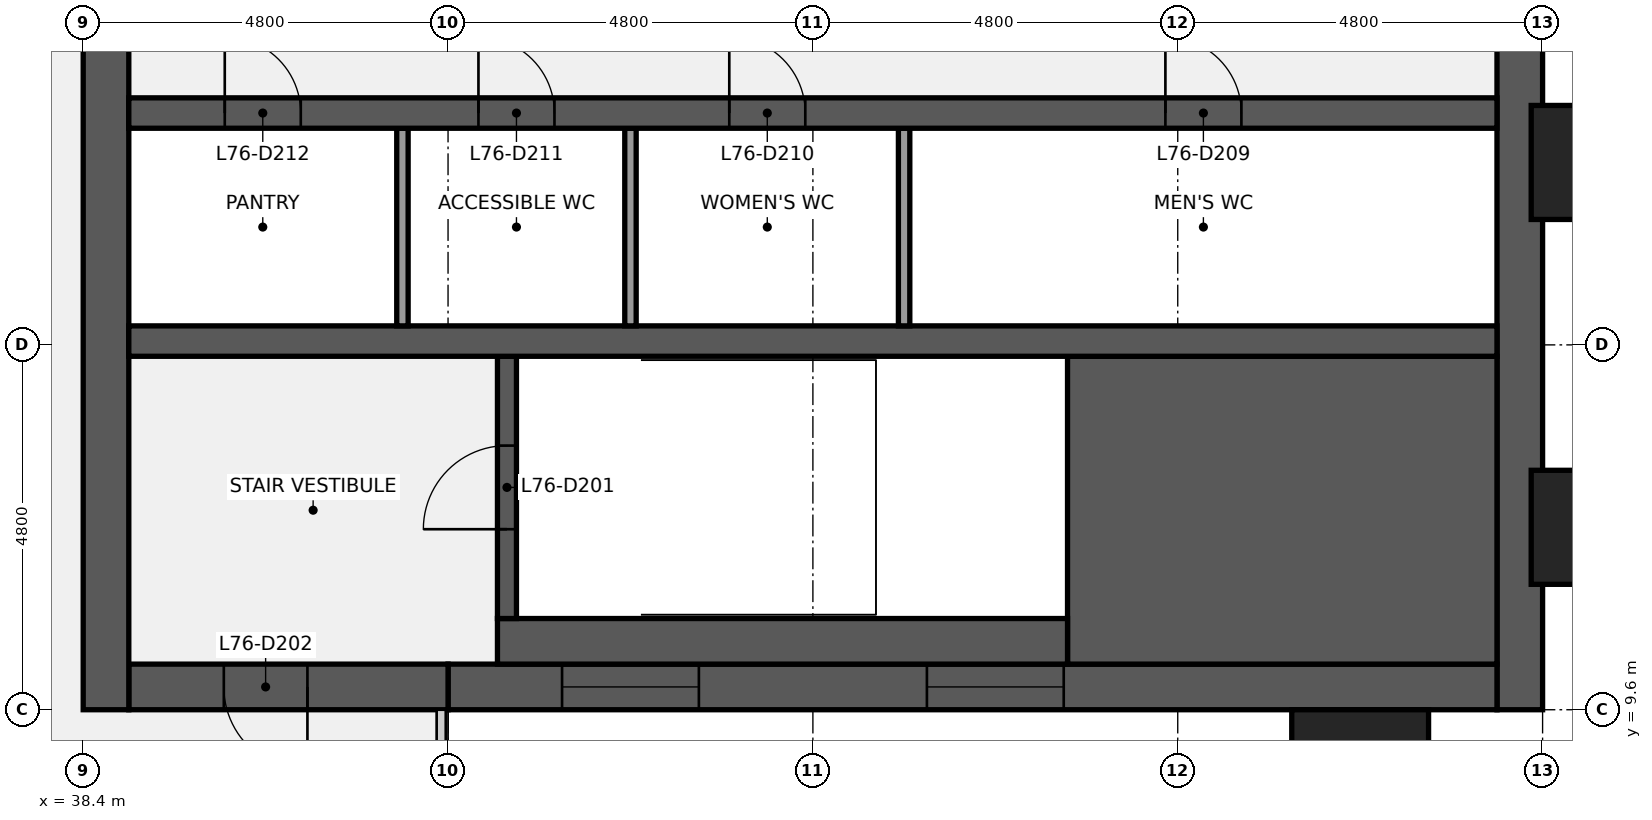
"""IFC4 building model, lengths in metres.
Left out: names, types, materials, properties, quantities, classifications, styles, units other than length and angle.
Written with IfcOpenShell. Run it as: python <this file> out.ifc"""

import sys

from ifc_helpers import new_model, si_unit, direction, frame, frame_2d, origin, origin_2d, place, context, subcontext, project, spatial, rectangle, extrude, element, fill, save


model = new_model("IFC4")
c1 = context("Model", 3, precision=1e-05, world=origin(), true_north=direction((0.0, 1.0)))
c2 = subcontext(c1, "Body", "Model", "MODEL_VIEW")
j1 = project(units=[si_unit("LENGTHUNIT", "METRE"), si_unit("PLANEANGLEUNIT", "RADIAN")], contexts=[c1])
p1 = place(None, origin())
s1 = spatial("IfcSite", under=j1, at=p1, CompositionType="ELEMENT")
p2 = place(p1, origin())
s2 = spatial("IfcBuilding", under=s1, at=p2, CompositionType="ELEMENT")
p3 = place(p2, frame((0.0, 0.0, 342.3)))
s3 = spatial("IfcBuildingStorey", under=s2, at=p3, CompositionType="ELEMENT", Elevation=342.3)
p4 = place(p3, frame((57.3, 38.4, 0.0), z_axis=(0.0, 0.0, 1.0), x_axis=(0.0, -1.0, 0.0)))
e1 = element("IfcWall", 1, at=p4, inside=s3, PredefinedType="SHEAR", context=c2, shape_type="SweptSolid", body=[
    extrude(rectangle(XDim=28.8, YDim=0.6, at=frame_2d((14.4, 0.0))), origin(), (0.0, 0.0, 1.0), 3.84),
])
p5 = place(p4, frame((18.45, 0.0, 0.9)))
e2 = element("IfcOpeningElement", 2, at=p5, cuts=e1, PredefinedType="OPENING", context=c2, shape_type="SweptSolid", body=[
    extrude(rectangle(XDim=1.5, YDim=1.5, at=frame_2d((0.75, 0.75))), frame((0.0, 0.31, 0.0), z_axis=(0.0, -1.0, 0.0), x_axis=(1.0, 0.0, 0.0)), (0.0, 0.0, 1.0), 0.62),
])
p6 = place(p4, frame((8.85, 0.0, 0.9)))
e3 = element("IfcOpeningElement", 3, at=p6, cuts=e1, PredefinedType="OPENING", context=c2, shape_type="SweptSolid", body=[
    extrude(rectangle(XDim=1.5, YDim=1.5, at=frame_2d((0.75, 0.75))), frame((0.0, 0.31, 0.0), z_axis=(0.0, -1.0, 0.0), x_axis=(1.0, 0.0, 0.0)), (0.0, 0.0, 1.0), 0.62),
])
p7 = place(p3, frame((57.0, 9.9, 0.0), z_axis=(0.0, 0.0, 1.0), x_axis=(-1.0, 0.0, 0.0)))
e4 = element("IfcWall", 4, at=p7, inside=s3, PredefinedType="SHEAR", context=c2, shape_type="SweptSolid", body=[
    extrude(rectangle(XDim=13.8, YDim=0.6, at=frame_2d((6.9, 0.0))), origin(), (0.0, 0.0, 1.0), 3.84),
])
p8 = place(p7, frame((5.7, 0.0, 0.9)))
e5 = element("IfcOpeningElement", 5, at=p8, cuts=e4, PredefinedType="OPENING", context=c2, shape_type="SweptSolid", body=[
    extrude(rectangle(XDim=1.8, YDim=1.5, at=frame_2d((0.9, 0.75))), frame((0.0, 0.31, 0.0), z_axis=(0.0, -1.0, 0.0), x_axis=(1.0, 0.0, 0.0)), (0.0, 0.0, 1.0), 0.62),
])
p9 = place(p7, frame((10.5, 0.0, 0.9)))
e6 = element("IfcOpeningElement", 6, at=p9, cuts=e4, PredefinedType="OPENING", context=c2, shape_type="SweptSolid", body=[
    extrude(rectangle(XDim=1.8, YDim=1.5, at=frame_2d((0.9, 0.75))), frame((0.0, 0.31, 0.0), z_axis=(0.0, -1.0, 0.0), x_axis=(1.0, 0.0, 0.0)), (0.0, 0.0, 1.0), 0.62),
])
p10 = place(p3, frame((43.2, 9.9, 0.0), z_axis=(0.0, 0.0, 1.0), x_axis=(-1.0, 0.0, 0.0)))
e7 = element("IfcWall", 7, at=p10, inside=s3, PredefinedType="SHEAR", context=c2, shape_type="SweptSolid", body=[
    extrude(rectangle(XDim=4.2, YDim=0.6, at=frame_2d((2.1, 0.0))), origin(), (0.0, 0.0, 1.0), 3.84),
])
p11 = place(p10, frame((1.85, 0.0, 0.0)))
e8 = element("IfcOpeningElement", 8, at=p11, cuts=e7, PredefinedType="OPENING", context=c2, shape_type="SweptSolid", body=[
    extrude(rectangle(XDim=1.1, YDim=2.1, at=frame_2d((0.55, 1.05))), frame((0.0, 0.31, 0.0), z_axis=(0.0, -1.0, 0.0), x_axis=(1.0, 0.0, 0.0)), (0.0, 0.0, 1.0), 0.62),
])
p12 = place(p3, frame((38.7, 9.6, 0.0), z_axis=(0.0, 0.0, 1.0), x_axis=(0.0, 1.0, 0.0)))
e9 = element("IfcWall", 9, at=p12, inside=s3, PredefinedType="SHEAR", context=c2, shape_type="SweptSolid", body=[
    extrude(rectangle(XDim=28.8, YDim=0.6, at=frame_2d((14.4, 0.0))), origin(), (0.0, 0.0, 1.0), 3.84),
])
p13 = place(p12, frame((8.7, 0.0, 0.0)))
e10 = element("IfcOpeningElement", 10, at=p13, cuts=e9, PredefinedType="OPENING", context=c2, shape_type="SweptSolid", body=[
    extrude(rectangle(XDim=1.8, YDim=2.1, at=frame_2d((0.9, 1.05))), frame((0.0, 0.31, 0.0), z_axis=(0.0, -1.0, 0.0), x_axis=(1.0, 0.0, 0.0)), (0.0, 0.0, 1.0), 0.62),
])
p14 = place(p12, frame((18.3, 0.0, 0.0)))
e11 = element("IfcOpeningElement", 11, at=p14, cuts=e9, PredefinedType="OPENING", context=c2, shape_type="SweptSolid", body=[
    extrude(rectangle(XDim=1.8, YDim=2.1, at=frame_2d((0.9, 1.05))), frame((0.0, 0.31, 0.0), z_axis=(0.0, -1.0, 0.0), x_axis=(1.0, 0.0, 0.0)), (0.0, 0.0, 1.0), 0.62),
])
p15 = place(p3, frame((51.35, 12.225, 0.0), z_axis=(0.0, 0.0, 1.0), x_axis=(1.0, 0.0, 0.0)))
e12 = element("IfcWall", 12, at=p15, inside=s3, PredefinedType="SHEAR", context=c2, shape_type="SweptSolid", body=[
    extrude(rectangle(XDim=5.65, YDim=4.05, at=frame_2d((2.825, 0.0))), origin(), (0.0, 0.0, 1.0), 3.84),
])
p16 = place(p3, frame((43.85, 10.5, 0.0), z_axis=(0.0, 0.0, 1.0), x_axis=(1.0, 0.0, 0.0)))
e13 = element("IfcWall", 13, at=p16, inside=s3, PredefinedType="SHEAR", context=c2, shape_type="SweptSolid", body=[
    extrude(rectangle(XDim=7.5, YDim=0.6, at=frame_2d((3.75, 0.0))), origin(), (0.0, 0.0, 1.0), 3.84),
])
p17 = place(p3, frame((43.975, 10.8, 0.0), z_axis=(0.0, 0.0, 1.0), x_axis=(0.0, 1.0, 0.0)))
e14 = element("IfcWall", 14, at=p17, inside=s3, PredefinedType="SHEAR", context=c2, shape_type="SweptSolid", body=[
    extrude(rectangle(XDim=3.45, YDim=0.25, at=frame_2d((1.725, 0.0))), origin(), (0.0, 0.0, 1.0), 3.84),
])
p18 = place(p17, frame((1.175, 0.0, 0.0)))
e15 = element("IfcOpeningElement", 15, at=p18, cuts=e14, PredefinedType="OPENING", context=c2, shape_type="SweptSolid", body=[
    extrude(rectangle(XDim=1.1, YDim=2.1, at=frame_2d((0.55, 1.05))), frame((0.0, 0.135, 0.0), z_axis=(0.0, -1.0, 0.0), x_axis=(1.0, 0.0, 0.0)), (0.0, 0.0, 1.0), 0.27),
])
p19 = place(p3, frame((39.0, 14.45, 0.0), z_axis=(0.0, 0.0, 1.0), x_axis=(1.0, 0.0, 0.0)))
e16 = element("IfcWall", 16, at=p19, inside=s3, PredefinedType="SHEAR", context=c2, shape_type="SweptSolid", body=[
    extrude(rectangle(XDim=18.0, YDim=0.4, at=frame_2d((9.0, 0.0))), origin(), (0.0, 0.0, 1.0), 3.84),
])
for number, where, z_axis, x_axis in (
    (17, (49.2, 14.65, 0.0), (0.0, 0.0, 1.0), (0.0, 1.0, 0.0)),
    (18, (45.6, 14.65, 0.0), (0.0, 0.0, 1.0), (0.0, 1.0, 0.0)),
    (19, (42.6, 14.65, 0.0), (0.0, 0.0, 1.0), (0.0, 1.0, 0.0)),
):
    element("IfcWall", number, at=place(p3, frame(where, z_axis=z_axis, x_axis=x_axis)), inside=s3, PredefinedType="PARTITIONING", context=c2, shape_type="SweptSolid", body=[
        extrude(rectangle(XDim=2.6, YDim=0.15, at=frame_2d((1.3, 0.0))), origin(), (0.0, 0.0, 1.0), 3.84),
    ])
p20 = place(p3, frame((39.0, 17.45, 0.0), z_axis=(0.0, 0.0, 1.0), x_axis=(1.0, 0.0, 0.0)))
e20 = element("IfcWall", 20, at=p20, inside=s3, PredefinedType="SHEAR", context=c2, shape_type="SweptSolid", body=[
    extrude(rectangle(XDim=18.0, YDim=0.4, at=frame_2d((9.0, 0.0))), origin(), (0.0, 0.0, 1.0), 3.84),
])
p21 = place(p20, frame((13.637, 0.0, 0.0)))
e21 = element("IfcOpeningElement", 21, at=p21, cuts=e20, PredefinedType="OPENING", context=c2, shape_type="SweptSolid", body=[
    extrude(rectangle(XDim=1.0, YDim=2.1, at=frame_2d((0.5, 1.05))), frame((0.0, 0.21, 0.0), z_axis=(0.0, -1.0, 0.0), x_axis=(1.0, 0.0, 0.0)), (0.0, 0.0, 1.0), 0.42),
])
p22 = place(p20, frame((7.9, 0.0, 0.0)))
e22 = element("IfcOpeningElement", 22, at=p22, cuts=e20, PredefinedType="OPENING", context=c2, shape_type="SweptSolid", body=[
    extrude(rectangle(XDim=1.0, YDim=2.1, at=frame_2d((0.5, 1.05))), frame((0.0, 0.21, 0.0), z_axis=(0.0, -1.0, 0.0), x_axis=(1.0, 0.0, 0.0)), (0.0, 0.0, 1.0), 0.42),
])
p23 = place(p20, frame((4.6, 0.0, 0.0)))
e23 = element("IfcOpeningElement", 23, at=p23, cuts=e20, PredefinedType="OPENING", context=c2, shape_type="SweptSolid", body=[
    extrude(rectangle(XDim=1.0, YDim=2.1, at=frame_2d((0.5, 1.05))), frame((0.0, 0.21, 0.0), z_axis=(0.0, -1.0, 0.0), x_axis=(1.0, 0.0, 0.0)), (0.0, 0.0, 1.0), 0.42),
])
p24 = place(p20, frame((1.262, 0.0, 0.0)))
e24 = element("IfcOpeningElement", 24, at=p24, cuts=e20, PredefinedType="OPENING", context=c2, shape_type="SweptSolid", body=[
    extrude(rectangle(XDim=1.0, YDim=2.1, at=frame_2d((0.5, 1.05))), frame((0.0, 0.21, 0.0), z_axis=(0.0, -1.0, 0.0), x_axis=(1.0, 0.0, 0.0)), (0.0, 0.0, 1.0), 0.42),
])
for number, where, z_axis, x_axis in (
    (25, (55.2, 8.85, 0.0), (0.0, 0.0, 1.0), (1.0, 0.0, 0.0)),
    (26, (58.35, 12.0, 0.0), (0.0, 0.0, 1.0), (0.0, 1.0, 0.0)),
    (27, (58.35, 16.8, 0.0), (0.0, 0.0, 1.0), (0.0, 1.0, 0.0)),
):
    element("IfcColumn", number, at=place(p3, frame(where, z_axis=z_axis, x_axis=x_axis)), inside=s3, PredefinedType="PILASTER", context=c2, shape_type="SweptSolid", body=[
        extrude(rectangle(XDim=1.8, YDim=1.5, at=origin_2d()), origin(), (0.0, 0.0, 1.0), 4.0),
    ])
p25 = place(p18, origin())
e28 = element("IfcDoor", 28, at=p25, inside=s3, OperationType="SINGLE_SWING_LEFT", PredefinedType="DOOR", context=c2, shape_type="SweptSolid", body=[
    extrude(rectangle(XDim=1.1, YDim=2.1, at=frame_2d((0.55, 1.05))), frame((0.0, 0.025, 0.0), z_axis=(0.0, -1.0, 0.0), x_axis=(1.0, 0.0, 0.0)), (0.0, 0.0, 1.0), 0.05),
])
fill(e15, e28)
p26 = place(p11, origin())
e29 = element("IfcDoor", 29, at=p26, inside=s3, OperationType="SINGLE_SWING_LEFT", PredefinedType="DOOR", context=c2, shape_type="SweptSolid", body=[
    extrude(rectangle(XDim=1.1, YDim=2.1, at=frame_2d((0.55, 1.05))), frame((0.0, 0.025, 0.0), z_axis=(0.0, -1.0, 0.0), x_axis=(1.0, 0.0, 0.0)), (0.0, 0.0, 1.0), 0.05),
])
fill(e8, e29)
p27 = place(p21, origin())
e30 = element("IfcDoor", 30, at=p27, inside=s3, OperationType="SINGLE_SWING_LEFT", PredefinedType="DOOR", context=c2, shape_type="SweptSolid", body=[
    extrude(rectangle(XDim=1.0, YDim=2.1, at=frame_2d((0.5, 1.05))), frame((0.0, 0.025, 0.0), z_axis=(0.0, -1.0, 0.0), x_axis=(1.0, 0.0, 0.0)), (0.0, 0.0, 1.0), 0.05),
])
fill(e21, e30)
p28 = place(p22, origin())
e31 = element("IfcDoor", 31, at=p28, inside=s3, OperationType="SINGLE_SWING_LEFT", PredefinedType="DOOR", context=c2, shape_type="SweptSolid", body=[
    extrude(rectangle(XDim=1.0, YDim=2.1, at=frame_2d((0.5, 1.05))), frame((0.0, 0.025, 0.0), z_axis=(0.0, -1.0, 0.0), x_axis=(1.0, 0.0, 0.0)), (0.0, 0.0, 1.0), 0.05),
])
fill(e22, e31)
p29 = place(p23, origin())
e32 = element("IfcDoor", 32, at=p29, inside=s3, OperationType="SINGLE_SWING_LEFT", PredefinedType="DOOR", context=c2, shape_type="SweptSolid", body=[
    extrude(rectangle(XDim=1.0, YDim=2.1, at=frame_2d((0.5, 1.05))), frame((0.0, 0.025, 0.0), z_axis=(0.0, -1.0, 0.0), x_axis=(1.0, 0.0, 0.0)), (0.0, 0.0, 1.0), 0.05),
])
fill(e23, e32)
p30 = place(p24, origin())
e33 = element("IfcDoor", 33, at=p30, inside=s3, OperationType="SINGLE_SWING_LEFT", PredefinedType="DOOR", context=c2, shape_type="SweptSolid", body=[
    extrude(rectangle(XDim=1.0, YDim=2.1, at=frame_2d((0.5, 1.05))), frame((0.0, 0.025, 0.0), z_axis=(0.0, -1.0, 0.0), x_axis=(1.0, 0.0, 0.0)), (0.0, 0.0, 1.0), 0.05),
])
fill(e24, e33)
p31 = place(p8, origin())
e34 = element("IfcWindow", 34, at=p31, inside=s3, PartitioningType="SINGLE_PANEL", PredefinedType="WINDOW", context=c2, shape_type="SweptSolid", body=[
    extrude(rectangle(XDim=1.8, YDim=1.5, at=frame_2d((0.9, 0.75))), frame((0.0, 0.03, 0.0), z_axis=(0.0, -1.0, 0.0), x_axis=(1.0, 0.0, 0.0)), (0.0, 0.0, 1.0), 0.06),
])
fill(e5, e34)
p32 = place(p9, origin())
e35 = element("IfcWindow", 35, at=p32, inside=s3, PartitioningType="SINGLE_PANEL", PredefinedType="WINDOW", context=c2, shape_type="SweptSolid", body=[
    extrude(rectangle(XDim=1.8, YDim=1.5, at=frame_2d((0.9, 0.75))), frame((0.0, 0.03, 0.0), z_axis=(0.0, -1.0, 0.0), x_axis=(1.0, 0.0, 0.0)), (0.0, 0.0, 1.0), 0.06),
])
fill(e6, e35)
save(model, sys.argv[1])
